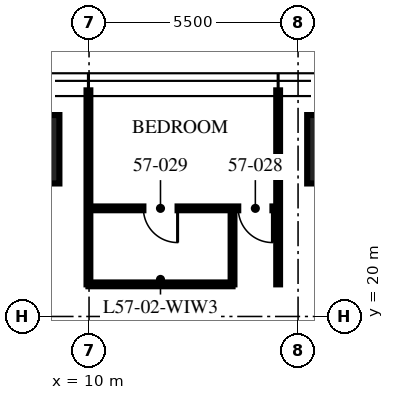
"""IFC4 building model, lengths in metres.
Left out: names, types, materials, properties, quantities, classifications, styles, units other than length and angle.
Written with IfcOpenShell. Run it as: python <this file> out.ifc"""

import sys

from ifc_helpers import new_model, si_unit, direction, frame, frame_2d, origin, origin_2d, place, context, subcontext, project, spatial, rectangle, extrude, element, fill, save


model = new_model("IFC4")
c1 = context("Model", 3, precision=1e-05, world=origin(), true_north=direction((0.0, 1.0)))
c2 = subcontext(c1, "Body", "Model", "MODEL_VIEW")
j1 = project(units=[si_unit("LENGTHUNIT", "METRE"), si_unit("PLANEANGLEUNIT", "RADIAN")], contexts=[c1])
p1 = place(None, origin())
s1 = spatial("IfcSite", under=j1, at=p1, CompositionType="ELEMENT")
p2 = place(p1, origin())
s2 = spatial("IfcBuilding", under=s1, at=p2, CompositionType="ELEMENT")
p3 = place(p2, frame((0.0, 0.0, 229.5)))
s3 = spatial("IfcBuildingStorey", under=s2, at=p3, CompositionType="ELEMENT", Elevation=229.5)
for number, where, z_axis, x_axis in (
    (1, (8.32, 24.4, 0.0), (0.0, 0.0, 1.0), (1.0, 0.0, 0.0)),
    (2, (16.64, 24.4, 0.0), (0.0, 0.0, 1.0), (1.0, 0.0, 0.0)),
):
    element("IfcColumn", number, at=place(p3, frame(where, z_axis=z_axis, x_axis=x_axis)), inside=s3, PredefinedType="COLUMN", context=c2, shape_type="SweptSolid", body=[
        extrude(rectangle(XDim=1.8, YDim=1.8, at=origin_2d()), origin(), (0.0, 0.0, 1.0), 3.75),
    ])
for number, where, z_axis, x_axis in (
    (3, (14.976, 20.845, 0.0), (0.0, 0.0, 1.0), (0.0, 1.0, 0.0)),
    (4, (9.984, 20.845, 0.0), (0.0, 0.0, 1.0), (0.0, 1.0, 0.0)),
):
    element("IfcWall", number, at=place(p3, frame(where, z_axis=z_axis, x_axis=x_axis)), inside=s3, PredefinedType="PARTITIONING", context=c2, shape_type="SweptSolid", body=[
        extrude(rectangle(XDim=5.105, YDim=0.1, at=frame_2d((2.552, 0.0))), origin(), (0.0, 0.0, 1.0), 2.91),
    ])
p4 = place(p3, frame((14.976, 22.845, 0.0), z_axis=(0.0, 0.0, 1.0), x_axis=(-1.0, 0.0, 0.0)))
e5 = element("IfcWall", 5, at=p4, inside=s3, PredefinedType="PARTITIONING", context=c2, shape_type="SweptSolid", body=[
    extrude(rectangle(XDim=4.992, YDim=0.1, at=frame_2d((2.496, 0.0))), origin(), (0.0, 0.0, 1.0), 2.81),
])
p5 = place(p4, frame((0.15, 0.0, 0.0)))
e6 = element("IfcOpeningElement", 6, at=p5, cuts=e5, PredefinedType="OPENING", context=c2, shape_type="SweptSolid", body=[
    extrude(rectangle(XDim=0.9, YDim=2.1, at=frame_2d((0.45, 1.05))), frame((0.0, 0.06, 0.0), z_axis=(0.0, -1.0, 0.0), x_axis=(1.0, 0.0, 0.0)), (0.0, 0.0, 1.0), 0.12),
])
p6 = place(p4, frame((2.646, 0.0, 0.0)))
e7 = element("IfcOpeningElement", 7, at=p6, cuts=e5, PredefinedType="OPENING", context=c2, shape_type="SweptSolid", body=[
    extrude(rectangle(XDim=0.9, YDim=2.1, at=frame_2d((0.45, 1.05))), frame((0.0, 0.06, 0.0), z_axis=(0.0, -1.0, 0.0), x_axis=(1.0, 0.0, 0.0)), (0.0, 0.0, 1.0), 0.12),
])
p7 = place(p3, frame((13.776, 20.845, 0.0), z_axis=(0.0, 0.0, 1.0), x_axis=(0.0, 1.0, 0.0)))
e8 = element("IfcWall", 8, at=p7, inside=s3, PredefinedType="PARTITIONING", context=c2, shape_type="SweptSolid", body=[
    extrude(rectangle(XDim=2.0, YDim=0.1, at=frame_2d((1.0, 0.0))), origin(), (0.0, 0.0, 1.0), 3.5),
])
p8 = place(p3, frame((13.776, 20.845, 0.0), z_axis=(0.0, 0.0, 1.0), x_axis=(-1.0, 0.0, 0.0)))
e9 = element("IfcWall", 9, at=p8, inside=s3, PredefinedType="PARTITIONING", context=c2, shape_type="SweptSolid", body=[
    extrude(rectangle(XDim=3.792, YDim=0.1, at=frame_2d((1.896, 0.0))), origin(), (0.0, 0.0, 1.0), 2.81),
])
p9 = place(p5, origin())
e10 = element("IfcDoor", 10, at=p9, inside=s3, OperationType="SINGLE_SWING_LEFT", PredefinedType="DOOR", context=c2, shape_type="SweptSolid", body=[
    extrude(rectangle(XDim=0.9, YDim=2.1, at=frame_2d((0.45, 1.05))), frame((0.0, 0.025, 0.0), z_axis=(0.0, -1.0, 0.0), x_axis=(1.0, 0.0, 0.0)), (0.0, 0.0, 1.0), 0.05),
])
fill(e6, e10)
p10 = place(p6, origin())
e11 = element("IfcDoor", 11, at=p10, inside=s3, OperationType="SINGLE_SWING_LEFT", PredefinedType="DOOR", context=c2, shape_type="SweptSolid", body=[
    extrude(rectangle(XDim=0.9, YDim=2.1, at=frame_2d((0.45, 1.05))), frame((0.0, 0.025, 0.0), z_axis=(0.0, -1.0, 0.0), x_axis=(1.0, 0.0, 0.0)), (0.0, 0.0, 1.0), 0.05),
])
fill(e7, e11)
save(model, sys.argv[1])
